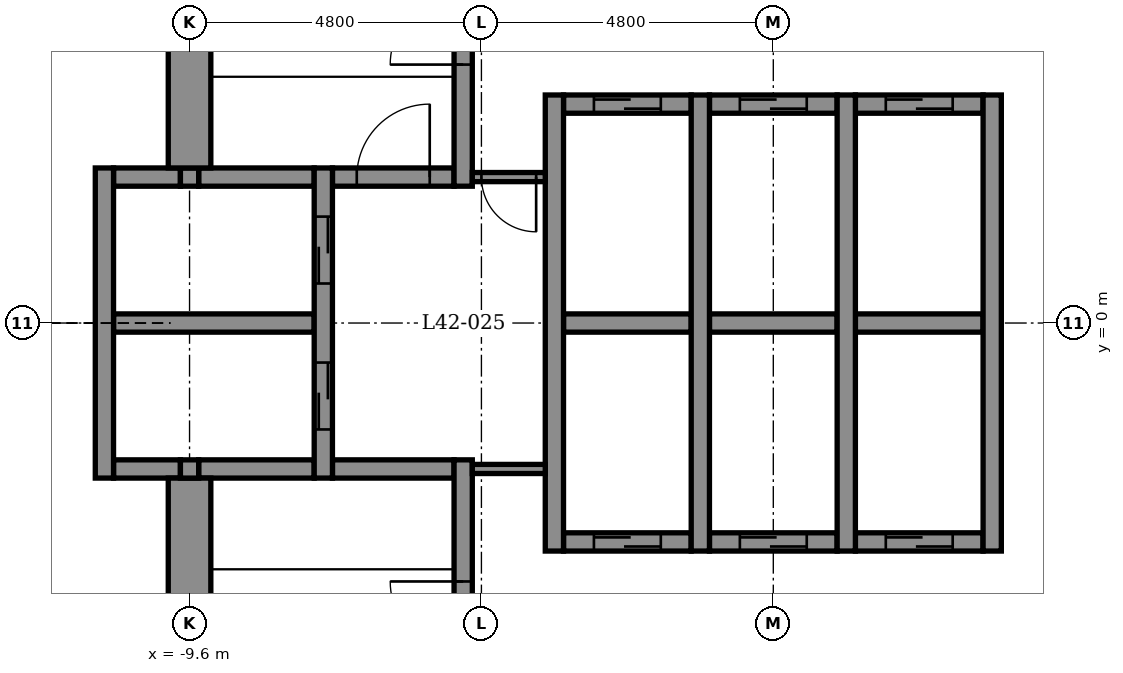
"""IFC4 building model, lengths in metres.
Left out: names, types, materials, properties, quantities, classifications, styles, units other than length and angle.
Written with IfcOpenShell. Run it as: python <this file> out.ifc"""

import sys

from ifc_helpers import new_model, si_unit, direction, frame, frame_2d, origin, place, context, subcontext, project, spatial, rectangle, extrude, element, fill, save


model = new_model("IFC4")
c1 = context("Model", 3, precision=1e-05, world=origin(), true_north=direction((0.0, 1.0)))
c2 = subcontext(c1, "Body", "Model", "MODEL_VIEW")
j1 = project(units=[si_unit("LENGTHUNIT", "METRE"), si_unit("PLANEANGLEUNIT", "RADIAN")], contexts=[c1])
p1 = place(None, origin())
s1 = spatial("IfcSite", under=j1, at=p1, CompositionType="ELEMENT")
p2 = place(p1, origin())
s2 = spatial("IfcBuilding", under=s1, at=p2, CompositionType="ELEMENT")
p3 = place(p2, frame((0.0, 0.0, 197.3)))
s3 = spatial("IfcBuildingStorey", under=s2, at=p3, CompositionType="ELEMENT", Elevation=197.3)
p4 = place(p3, frame((-3.45, -3.6, -0.15), z_axis=(0.0, 0.0, 1.0), x_axis=(1.0, 0.0, 0.0)))
e1 = element("IfcWall", 1, at=p4, inside=s3, PredefinedType="STANDARD", context=c2, shape_type="SweptSolid", body=[
    extrude(rectangle(XDim=2.1, YDim=0.3, at=frame_2d((1.05, 0.0))), origin(), (0.0, 0.0, 1.0), 3.9),
])
p5 = place(p4, frame((0.5, 0.0, 0.15)))
e2 = element("IfcOpeningElement", 2, at=p5, cuts=e1, PredefinedType="OPENING", context=c2, shape_type="SweptSolid", body=[
    extrude(rectangle(XDim=1.1, YDim=2.1, at=frame_2d((0.55, 1.05))), frame((0.0, 0.16, 0.0), z_axis=(0.0, -1.0, 0.0), x_axis=(1.0, 0.0, 0.0)), (0.0, 0.0, 1.0), 0.32),
])
p6 = place(p3, frame((-1.05, -3.6, -0.15), z_axis=(0.0, 0.0, 1.0), x_axis=(1.0, 0.0, 0.0)))
e3 = element("IfcWall", 3, at=p6, inside=s3, PredefinedType="STANDARD", context=c2, shape_type="SweptSolid", body=[
    extrude(rectangle(XDim=2.1, YDim=0.3, at=frame_2d((1.05, 0.0))), origin(), (0.0, 0.0, 1.0), 3.9),
])
p7 = place(p6, frame((0.5, 0.0, 0.15)))
e4 = element("IfcOpeningElement", 4, at=p7, cuts=e3, PredefinedType="OPENING", context=c2, shape_type="SweptSolid", body=[
    extrude(rectangle(XDim=1.1, YDim=2.1, at=frame_2d((0.55, 1.05))), frame((0.0, 0.16, 0.0), z_axis=(0.0, -1.0, 0.0), x_axis=(1.0, 0.0, 0.0)), (0.0, 0.0, 1.0), 0.32),
])
p8 = place(p3, frame((1.35, -3.6, -0.15), z_axis=(0.0, 0.0, 1.0), x_axis=(1.0, 0.0, 0.0)))
e5 = element("IfcWall", 5, at=p8, inside=s3, PredefinedType="STANDARD", context=c2, shape_type="SweptSolid", body=[
    extrude(rectangle(XDim=2.1, YDim=0.3, at=frame_2d((1.05, 0.0))), origin(), (0.0, 0.0, 1.0), 3.9),
])
p9 = place(p8, frame((0.5, 0.0, 0.15)))
e6 = element("IfcOpeningElement", 6, at=p9, cuts=e5, PredefinedType="OPENING", context=c2, shape_type="SweptSolid", body=[
    extrude(rectangle(XDim=1.1, YDim=2.1, at=frame_2d((0.55, 1.05))), frame((0.0, 0.16, 0.0), z_axis=(0.0, -1.0, 0.0), x_axis=(1.0, 0.0, 0.0)), (0.0, 0.0, 1.0), 0.32),
])
p10 = place(p3, frame((-10.85, -2.4, -0.15), z_axis=(0.0, 0.0, 1.0), x_axis=(1.0, 0.0, 0.0)))
e7 = element("IfcWall", 7, at=p10, inside=s3, PredefinedType="STANDARD", context=c2, shape_type="SweptSolid", body=[
    extrude(rectangle(XDim=1.1, YDim=0.3, at=frame_2d((0.55, 0.0))), origin(), (0.0, 0.0, 1.0), 3.9),
])
p11 = place(p3, frame((-9.45, -2.4, -0.15), z_axis=(0.0, 0.0, 1.0), x_axis=(1.0, 0.0, 0.0)))
e8 = element("IfcWall", 8, at=p11, inside=s3, PredefinedType="STANDARD", context=c2, shape_type="SweptSolid", body=[
    extrude(rectangle(XDim=1.9, YDim=0.3, at=frame_2d((0.95, 0.0))), origin(), (0.0, 0.0, 1.0), 3.9),
])
p12 = place(p3, frame((-7.25, -2.4, -0.15), z_axis=(0.0, 0.0, 1.0), x_axis=(1.0, 0.0, 0.0)))
e9 = element("IfcWall", 9, at=p12, inside=s3, PredefinedType="STANDARD", context=c2, shape_type="SweptSolid", body=[
    extrude(rectangle(XDim=2.0, YDim=0.3, at=frame_2d((1.0, 0.0))), origin(), (0.0, 0.0, 1.0), 3.9),
])
p13 = place(p3, frame((-10.85, 0.0, -0.15), z_axis=(0.0, 0.0, 1.0), x_axis=(1.0, 0.0, 0.0)))
e10 = element("IfcWall", 10, at=p13, inside=s3, PredefinedType="STANDARD", context=c2, shape_type="SweptSolid", body=[
    extrude(rectangle(XDim=3.3, YDim=0.3, at=frame_2d((1.65, 0.0))), origin(), (0.0, 0.0, 1.0), 3.9),
])
p14 = place(p3, frame((-3.45, 0.0, -0.15), z_axis=(0.0, 0.0, 1.0), x_axis=(1.0, 0.0, 0.0)))
e11 = element("IfcWall", 11, at=p14, inside=s3, PredefinedType="STANDARD", context=c2, shape_type="SweptSolid", body=[
    extrude(rectangle(XDim=2.1, YDim=0.3, at=frame_2d((1.05, 0.0))), origin(), (0.0, 0.0, 1.0), 3.9),
])
p15 = place(p3, frame((-1.05, 0.0, -0.15), z_axis=(0.0, 0.0, 1.0), x_axis=(1.0, 0.0, 0.0)))
e12 = element("IfcWall", 12, at=p15, inside=s3, PredefinedType="STANDARD", context=c2, shape_type="SweptSolid", body=[
    extrude(rectangle(XDim=2.1, YDim=0.3, at=frame_2d((1.05, 0.0))), origin(), (0.0, 0.0, 1.0), 3.9),
])
p16 = place(p3, frame((1.35, 0.0, -0.15), z_axis=(0.0, 0.0, 1.0), x_axis=(1.0, 0.0, 0.0)))
e13 = element("IfcWall", 13, at=p16, inside=s3, PredefinedType="STANDARD", context=c2, shape_type="SweptSolid", body=[
    extrude(rectangle(XDim=2.1, YDim=0.3, at=frame_2d((1.05, 0.0))), origin(), (0.0, 0.0, 1.0), 3.9),
])
p17 = place(p3, frame((-10.85, 2.4, -0.15), z_axis=(0.0, 0.0, 1.0), x_axis=(1.0, 0.0, 0.0)))
e14 = element("IfcWall", 14, at=p17, inside=s3, PredefinedType="STANDARD", context=c2, shape_type="SweptSolid", body=[
    extrude(rectangle(XDim=1.1, YDim=0.3, at=frame_2d((0.55, 0.0))), origin(), (0.0, 0.0, 1.0), 3.9),
])
p18 = place(p3, frame((-9.45, 2.4, -0.15), z_axis=(0.0, 0.0, 1.0), x_axis=(1.0, 0.0, 0.0)))
e15 = element("IfcWall", 15, at=p18, inside=s3, PredefinedType="STANDARD", context=c2, shape_type="SweptSolid", body=[
    extrude(rectangle(XDim=1.9, YDim=0.3, at=frame_2d((0.95, 0.0))), origin(), (0.0, 0.0, 1.0), 3.9),
])
p19 = place(p3, frame((-7.25, 2.4, -0.15), z_axis=(0.0, 0.0, 1.0), x_axis=(1.0, 0.0, 0.0)))
e16 = element("IfcWall", 16, at=p19, inside=s3, PredefinedType="STANDARD", context=c2, shape_type="SweptSolid", body=[
    extrude(rectangle(XDim=2.0, YDim=0.3, at=frame_2d((1.0, 0.0))), origin(), (0.0, 0.0, 1.0), 3.9),
])
p20 = place(p19, frame((0.4, 0.0, 0.15)))
e17 = element("IfcOpeningElement", 17, at=p20, cuts=e16, PredefinedType="OPENING", context=c2, shape_type="SweptSolid", body=[
    extrude(rectangle(XDim=1.2, YDim=2.1, at=frame_2d((0.6, 1.05))), frame((0.0, 0.16, 0.0), z_axis=(0.0, -1.0, 0.0), x_axis=(1.0, 0.0, 0.0)), (0.0, 0.0, 1.0), 0.32),
])
p21 = place(p3, frame((-3.45, 3.6, -0.15), z_axis=(0.0, 0.0, 1.0), x_axis=(1.0, 0.0, 0.0)))
e18 = element("IfcWall", 18, at=p21, inside=s3, PredefinedType="STANDARD", context=c2, shape_type="SweptSolid", body=[
    extrude(rectangle(XDim=2.1, YDim=0.3, at=frame_2d((1.05, 0.0))), origin(), (0.0, 0.0, 1.0), 3.9),
])
p22 = place(p21, frame((0.5, 0.0, 0.15)))
e19 = element("IfcOpeningElement", 19, at=p22, cuts=e18, PredefinedType="OPENING", context=c2, shape_type="SweptSolid", body=[
    extrude(rectangle(XDim=1.1, YDim=2.1, at=frame_2d((0.55, 1.05))), frame((0.0, 0.16, 0.0), z_axis=(0.0, -1.0, 0.0), x_axis=(1.0, 0.0, 0.0)), (0.0, 0.0, 1.0), 0.32),
])
p23 = place(p3, frame((-1.05, 3.6, -0.15), z_axis=(0.0, 0.0, 1.0), x_axis=(1.0, 0.0, 0.0)))
e20 = element("IfcWall", 20, at=p23, inside=s3, PredefinedType="STANDARD", context=c2, shape_type="SweptSolid", body=[
    extrude(rectangle(XDim=2.1, YDim=0.3, at=frame_2d((1.05, 0.0))), origin(), (0.0, 0.0, 1.0), 3.9),
])
p24 = place(p23, frame((0.5, 0.0, 0.15)))
e21 = element("IfcOpeningElement", 21, at=p24, cuts=e20, PredefinedType="OPENING", context=c2, shape_type="SweptSolid", body=[
    extrude(rectangle(XDim=1.1, YDim=2.1, at=frame_2d((0.55, 1.05))), frame((0.0, 0.16, 0.0), z_axis=(0.0, -1.0, 0.0), x_axis=(1.0, 0.0, 0.0)), (0.0, 0.0, 1.0), 0.32),
])
p25 = place(p3, frame((1.35, 3.6, -0.15), z_axis=(0.0, 0.0, 1.0), x_axis=(1.0, 0.0, 0.0)))
e22 = element("IfcWall", 22, at=p25, inside=s3, PredefinedType="STANDARD", context=c2, shape_type="SweptSolid", body=[
    extrude(rectangle(XDim=2.1, YDim=0.3, at=frame_2d((1.05, 0.0))), origin(), (0.0, 0.0, 1.0), 3.9),
])
p26 = place(p25, frame((0.5, 0.0, 0.15)))
e23 = element("IfcOpeningElement", 23, at=p26, cuts=e22, PredefinedType="OPENING", context=c2, shape_type="SweptSolid", body=[
    extrude(rectangle(XDim=1.1, YDim=2.1, at=frame_2d((0.55, 1.05))), frame((0.0, 0.16, 0.0), z_axis=(0.0, -1.0, 0.0), x_axis=(1.0, 0.0, 0.0)), (0.0, 0.0, 1.0), 0.32),
])
p27 = place(p3, frame((-11.0, -2.55, -0.15), z_axis=(0.0, 0.0, 1.0), x_axis=(0.0, 1.0, 0.0)))
e24 = element("IfcWall", 24, at=p27, inside=s3, PredefinedType="STANDARD", context=c2, shape_type="SweptSolid", body=[
    extrude(rectangle(XDim=5.1, YDim=0.3, at=frame_2d((2.55, 0.0))), origin(), (0.0, 0.0, 1.0), 3.9),
])
p28 = place(p3, frame((-9.6, -10.15, -0.15), z_axis=(0.0, 0.0, 1.0), x_axis=(0.0, 1.0, 0.0)))
e25 = element("IfcWall", 25, at=p28, inside=s3, PredefinedType="SHEAR", context=c2, shape_type="SweptSolid", body=[
    extrude(rectangle(XDim=7.6, YDim=0.7, at=frame_2d((3.8, 0.0))), origin(), (0.0, 0.0, 1.0), 3.9),
])
for number, where, z_axis, x_axis in (
    (26, (-9.6, -2.55, -0.15), (0.0, 0.0, 1.0), (0.0, 1.0, 0.0)),
    (27, (-9.6, 2.25, -0.15), (0.0, 0.0, 1.0), (0.0, 1.0, 0.0)),
):
    element("IfcWall", number, at=place(p3, frame(where, z_axis=z_axis, x_axis=x_axis)), inside=s3, PredefinedType="STANDARD", context=c2, shape_type="SweptSolid", body=[
        extrude(rectangle(XDim=0.3, YDim=0.3, at=frame_2d((0.15, 0.0))), origin(), (0.0, 0.0, 1.0), 3.9),
    ])
p29 = place(p3, frame((-9.6, 2.55, -0.15), z_axis=(0.0, 0.0, 1.0), x_axis=(0.0, 1.0, 0.0)))
e28 = element("IfcWall", 28, at=p29, inside=s3, PredefinedType="SHEAR", context=c2, shape_type="SweptSolid", body=[
    extrude(rectangle(XDim=7.6, YDim=0.7, at=frame_2d((3.8, 0.0))), origin(), (0.0, 0.0, 1.0), 3.9),
])
p30 = place(p3, frame((-7.4, -2.55, -0.15), z_axis=(0.0, 0.0, 1.0), x_axis=(0.0, 1.0, 0.0)))
e29 = element("IfcWall", 29, at=p30, inside=s3, PredefinedType="STANDARD", context=c2, shape_type="SweptSolid", body=[
    extrude(rectangle(XDim=5.1, YDim=0.3, at=frame_2d((2.55, 0.0))), origin(), (0.0, 0.0, 1.0), 3.9),
])
p31 = place(p30, frame((0.8, 0.0, 0.15)))
e30 = element("IfcOpeningElement", 30, at=p31, cuts=e29, PredefinedType="OPENING", context=c2, shape_type="SweptSolid", body=[
    extrude(rectangle(XDim=1.1, YDim=2.1, at=frame_2d((0.55, 1.05))), frame((0.0, 0.16, 0.0), z_axis=(0.0, -1.0, 0.0), x_axis=(1.0, 0.0, 0.0)), (0.0, 0.0, 1.0), 0.32),
])
p32 = place(p30, frame((3.2, 0.0, 0.15)))
e31 = element("IfcOpeningElement", 31, at=p32, cuts=e29, PredefinedType="OPENING", context=c2, shape_type="SweptSolid", body=[
    extrude(rectangle(XDim=1.1, YDim=2.1, at=frame_2d((0.55, 1.05))), frame((0.0, 0.16, 0.0), z_axis=(0.0, -1.0, 0.0), x_axis=(1.0, 0.0, 0.0)), (0.0, 0.0, 1.0), 0.32),
])
p33 = place(p3, frame((-5.1, -9.25, -0.15), z_axis=(0.0, 0.0, 1.0), x_axis=(0.0, 1.0, 0.0)))
e32 = element("IfcWall", 32, at=p33, inside=s3, PredefinedType="STANDARD", context=c2, shape_type="SweptSolid", body=[
    extrude(rectangle(XDim=7.0, YDim=0.3, at=frame_2d((3.5, 0.0))), origin(), (0.0, 0.0, 1.0), 3.9),
])
p34 = place(p33, frame((3.8, 0.0, 0.15)))
e33 = element("IfcOpeningElement", 33, at=p34, cuts=e32, PredefinedType="OPENING", context=c2, shape_type="SweptSolid", body=[
    extrude(rectangle(XDim=1.2, YDim=2.1, at=frame_2d((0.6, 1.05))), frame((0.0, 0.16, 0.0), z_axis=(0.0, -1.0, 0.0), x_axis=(1.0, 0.0, 0.0)), (0.0, 0.0, 1.0), 0.32),
])
p35 = place(p3, frame((-5.1, 2.25, -0.15), z_axis=(0.0, 0.0, 1.0), x_axis=(0.0, 1.0, 0.0)))
e34 = element("IfcWall", 34, at=p35, inside=s3, PredefinedType="STANDARD", context=c2, shape_type="SweptSolid", body=[
    extrude(rectangle(XDim=7.0, YDim=0.3, at=frame_2d((3.5, 0.0))), origin(), (0.0, 0.0, 1.0), 3.9),
])
p36 = place(p35, frame((2.0, 0.0, 0.15)))
e35 = element("IfcOpeningElement", 35, at=p36, cuts=e34, PredefinedType="OPENING", context=c2, shape_type="SweptSolid", body=[
    extrude(rectangle(XDim=1.2, YDim=2.1, at=frame_2d((0.6, 1.05))), frame((0.0, 0.16, 0.0), z_axis=(0.0, -1.0, 0.0), x_axis=(1.0, 0.0, 0.0)), (0.0, 0.0, 1.0), 0.32),
])
for number, where, z_axis, x_axis in (
    (36, (-3.6, -3.75, -0.15), (0.0, 0.0, 1.0), (0.0, 1.0, 0.0)),
    (37, (-1.2, -3.75, -0.15), (0.0, 0.0, 1.0), (0.0, 1.0, 0.0)),
    (38, (1.2, -3.75, -0.15), (0.0, 0.0, 1.0), (0.0, 1.0, 0.0)),
    (39, (3.6, -3.75, -0.15), (0.0, 0.0, 1.0), (0.0, 1.0, 0.0)),
):
    element("IfcWall", number, at=place(p3, frame(where, z_axis=z_axis, x_axis=x_axis)), inside=s3, PredefinedType="STANDARD", context=c2, shape_type="SweptSolid", body=[
        extrude(rectangle(XDim=7.5, YDim=0.3, at=frame_2d((3.75, 0.0))), origin(), (0.0, 0.0, 1.0), 3.9),
    ])
p37 = place(p3, frame((-4.95, 2.4, 0.0), z_axis=(0.0, 0.0, 1.0), x_axis=(1.0, 0.0, 0.0)))
e40 = element("IfcWall", 40, at=p37, inside=s3, PredefinedType="PARTITIONING", context=c2, shape_type="SweptSolid", body=[
    extrude(rectangle(XDim=1.2, YDim=0.15, at=frame_2d((0.6, 0.0))), origin(), (0.0, 0.0, 1.0), 3.75),
])
p38 = place(p37, frame((0.15, 0.0, 0.0)))
e41 = element("IfcOpeningElement", 41, at=p38, cuts=e40, PredefinedType="OPENING", context=c2, shape_type="SweptSolid", body=[
    extrude(rectangle(XDim=0.9, YDim=2.1, at=frame_2d((0.45, 1.05))), frame((0.0, 0.085, 0.0), z_axis=(0.0, -1.0, 0.0), x_axis=(1.0, 0.0, 0.0)), (0.0, 0.0, 1.0), 0.17),
])
p39 = place(p3, frame((-4.95, -2.4, 0.0), z_axis=(0.0, 0.0, 1.0), x_axis=(1.0, 0.0, 0.0)))
e42 = element("IfcWall", 42, at=p39, inside=s3, PredefinedType="PARTITIONING", context=c2, shape_type="SweptSolid", body=[
    extrude(rectangle(XDim=1.2, YDim=0.15, at=frame_2d((0.6, 0.0))), origin(), (0.0, 0.0, 1.0), 3.75),
])
p40 = place(p31, origin())
e43 = element("IfcDoor", 43, at=p40, inside=s3, OperationType="DOUBLE_DOOR_SLIDING", PredefinedType="DOOR", context=c2, shape_type="SweptSolid", body=[
    extrude(rectangle(XDim=1.1, YDim=2.1, at=frame_2d((0.55, 1.05))), frame((0.0, 0.025, 0.0), z_axis=(0.0, -1.0, 0.0), x_axis=(1.0, 0.0, 0.0)), (0.0, 0.0, 1.0), 0.05),
])
fill(e30, e43)
p41 = place(p32, origin())
e44 = element("IfcDoor", 44, at=p41, inside=s3, OperationType="DOUBLE_DOOR_SLIDING", PredefinedType="DOOR", context=c2, shape_type="SweptSolid", body=[
    extrude(rectangle(XDim=1.1, YDim=2.1, at=frame_2d((0.55, 1.05))), frame((0.0, 0.025, 0.0), z_axis=(0.0, -1.0, 0.0), x_axis=(1.0, 0.0, 0.0)), (0.0, 0.0, 1.0), 0.05),
])
fill(e31, e44)
p42 = place(p22, origin())
e45 = element("IfcDoor", 45, at=p42, inside=s3, OperationType="DOUBLE_DOOR_SLIDING", PredefinedType="DOOR", context=c2, shape_type="SweptSolid", body=[
    extrude(rectangle(XDim=1.1, YDim=2.1, at=frame_2d((0.55, 1.05))), frame((0.0, 0.025, 0.0), z_axis=(0.0, -1.0, 0.0), x_axis=(1.0, 0.0, 0.0)), (0.0, 0.0, 1.0), 0.05),
])
fill(e19, e45)
p43 = place(p24, origin())
e46 = element("IfcDoor", 46, at=p43, inside=s3, OperationType="DOUBLE_DOOR_SLIDING", PredefinedType="DOOR", context=c2, shape_type="SweptSolid", body=[
    extrude(rectangle(XDim=1.1, YDim=2.1, at=frame_2d((0.55, 1.05))), frame((0.0, 0.025, 0.0), z_axis=(0.0, -1.0, 0.0), x_axis=(1.0, 0.0, 0.0)), (0.0, 0.0, 1.0), 0.05),
])
fill(e21, e46)
p44 = place(p26, origin())
e47 = element("IfcDoor", 47, at=p44, inside=s3, OperationType="DOUBLE_DOOR_SLIDING", PredefinedType="DOOR", context=c2, shape_type="SweptSolid", body=[
    extrude(rectangle(XDim=1.1, YDim=2.1, at=frame_2d((0.55, 1.05))), frame((0.0, 0.025, 0.0), z_axis=(0.0, -1.0, 0.0), x_axis=(1.0, 0.0, 0.0)), (0.0, 0.0, 1.0), 0.05),
])
fill(e23, e47)
p45 = place(p5, origin())
e48 = element("IfcDoor", 48, at=p45, inside=s3, OperationType="DOUBLE_DOOR_SLIDING", PredefinedType="DOOR", context=c2, shape_type="SweptSolid", body=[
    extrude(rectangle(XDim=1.1, YDim=2.1, at=frame_2d((0.55, 1.05))), frame((0.0, 0.025, 0.0), z_axis=(0.0, -1.0, 0.0), x_axis=(1.0, 0.0, 0.0)), (0.0, 0.0, 1.0), 0.05),
])
fill(e2, e48)
p46 = place(p7, origin())
e49 = element("IfcDoor", 49, at=p46, inside=s3, OperationType="DOUBLE_DOOR_SLIDING", PredefinedType="DOOR", context=c2, shape_type="SweptSolid", body=[
    extrude(rectangle(XDim=1.1, YDim=2.1, at=frame_2d((0.55, 1.05))), frame((0.0, 0.025, 0.0), z_axis=(0.0, -1.0, 0.0), x_axis=(1.0, 0.0, 0.0)), (0.0, 0.0, 1.0), 0.05),
])
fill(e4, e49)
p47 = place(p9, origin())
e50 = element("IfcDoor", 50, at=p47, inside=s3, OperationType="DOUBLE_DOOR_SLIDING", PredefinedType="DOOR", context=c2, shape_type="SweptSolid", body=[
    extrude(rectangle(XDim=1.1, YDim=2.1, at=frame_2d((0.55, 1.05))), frame((0.0, 0.025, 0.0), z_axis=(0.0, -1.0, 0.0), x_axis=(1.0, 0.0, 0.0)), (0.0, 0.0, 1.0), 0.05),
])
fill(e6, e50)
p48 = place(p36, origin())
e51 = element("IfcDoor", 51, at=p48, inside=s3, OperationType="SINGLE_SWING_LEFT", PredefinedType="DOOR", context=c2, shape_type="SweptSolid", body=[
    extrude(rectangle(XDim=1.2, YDim=2.1, at=frame_2d((0.6, 1.05))), frame((0.0, 0.025, 0.0), z_axis=(0.0, -1.0, 0.0), x_axis=(1.0, 0.0, 0.0)), (0.0, 0.0, 1.0), 0.05),
])
fill(e35, e51)
p49 = place(p34, origin())
e52 = element("IfcDoor", 52, at=p49, inside=s3, OperationType="SINGLE_SWING_RIGHT", PredefinedType="DOOR", context=c2, shape_type="SweptSolid", body=[
    extrude(rectangle(XDim=1.2, YDim=2.1, at=frame_2d((0.6, 1.05))), frame((0.0, 0.025, 0.0), z_axis=(0.0, -1.0, 0.0), x_axis=(1.0, 0.0, 0.0)), (0.0, 0.0, 1.0), 0.05),
])
fill(e33, e52)
p50 = place(p38, frame((0.9, 0.0, 0.0), z_axis=(0.0, 0.0, 1.0), x_axis=(-1.0, 0.0, 0.0)))
e53 = element("IfcDoor", 53, at=p50, inside=s3, OperationType="SINGLE_SWING_RIGHT", PredefinedType="DOOR", context=c2, shape_type="SweptSolid", body=[
    extrude(rectangle(XDim=0.9, YDim=2.1, at=frame_2d((0.45, 1.05))), frame((0.0, 0.025, 0.0), z_axis=(0.0, -1.0, 0.0), x_axis=(1.0, 0.0, 0.0)), (0.0, 0.0, 1.0), 0.05),
])
fill(e41, e53)
p51 = place(p20, origin())
e54 = element("IfcDoor", 54, at=p51, inside=s3, OperationType="SINGLE_SWING_RIGHT", PredefinedType="DOOR", context=c2, shape_type="SweptSolid", body=[
    extrude(rectangle(XDim=1.2, YDim=2.1, at=frame_2d((0.6, 1.05))), frame((0.0, 0.025, 0.0), z_axis=(0.0, -1.0, 0.0), x_axis=(1.0, 0.0, 0.0)), (0.0, 0.0, 1.0), 0.05),
])
fill(e17, e54)
save(model, sys.argv[1])
